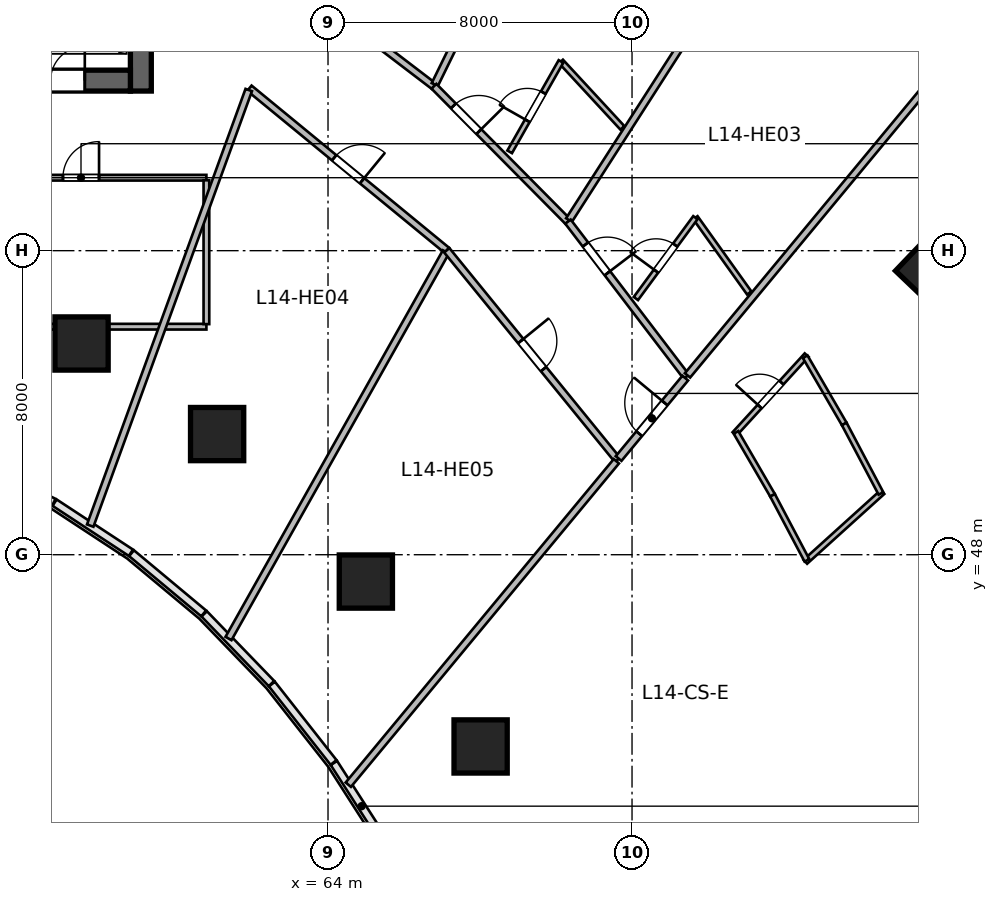
"""IFC4 building model, lengths in metres.
Left out: names, types, materials, properties, quantities, classifications, styles, units other than length and angle.
Written with IfcOpenShell. Run it as: python <this file> out.ifc"""

import sys

from ifc_helpers import new_model, si_unit, direction, frame, frame_2d, origin, origin_2d, place, context, subcontext, project, spatial, rectangle, circle, extrude, source, transform, mapped, element, fill, save


model = new_model("IFC4")
c1 = context("Model", 3, precision=1e-05, world=origin(), true_north=direction((0.0, 1.0)))
c2 = subcontext(c1, "Body", "Model", "MODEL_VIEW")
j1 = project(units=[si_unit("LENGTHUNIT", "METRE"), si_unit("PLANEANGLEUNIT", "RADIAN")], contexts=[c1])
p1 = place(None, origin())
s1 = spatial("IfcSite", under=j1, at=p1, CompositionType="ELEMENT")
p2 = place(p1, origin())
s2 = spatial("IfcBuilding", under=s1, at=p2, CompositionType="ELEMENT")
p3 = place(p2, frame((0.0, 0.0, 64.2)))
s3 = spatial("IfcBuildingStorey", under=s2, at=p3, CompositionType="ELEMENT", Elevation=64.2)
m1 = source(origin(), c2, "Body", "SweptSolid", [
    extrude(rectangle(XDim=12.0, YDim=0.55, at=frame_2d((6.0, 0.0))), origin(), (0.0, 0.0, 1.0), 3.6),
])
p4 = place(p3, frame((59.075, 60.2, 0.0), z_axis=(0.0, 0.0, 1.0), x_axis=(0.0, 1.0, 0.0)))
e1 = element("IfcWall", 1, at=p4, inside=s3, PredefinedType="SHEAR", context=c2, shape_type="MappedRepresentation", body=[
    mapped(m1, transform((0.0, 0.0, 0.0), scale=1.0)),
])
m2 = source(origin(), c2, "Body", "SweptSolid", [
    extrude(rectangle(XDim=21.6, YDim=0.55, at=frame_2d((10.8, 0.0))), origin(), (0.0, 0.0, 1.0), 3.6),
])
p5 = place(p3, frame((37.2, 60.475, 0.0), z_axis=(0.0, 0.0, 1.0), x_axis=(1.0, 0.0, 0.0)))
e2 = element("IfcWall", 2, at=p5, inside=s3, PredefinedType="SHEAR", context=c2, shape_type="MappedRepresentation", body=[
    mapped(m2, transform((0.0, 0.0, 0.0), scale=1.0)),
])
p6 = place(p5, frame((1.1, 0.0, 0.0)))
e3 = element("IfcOpeningElement", 3, at=p6, cuts=e2, PredefinedType="OPENING", context=c2, shape_type="SweptSolid", body=[
    extrude(rectangle(XDim=1.15, YDim=2.15, at=frame_2d((0.575, 1.075))), frame((0.0, 0.285, 0.0), z_axis=(0.0, -1.0, 0.0), x_axis=(1.0, 0.0, 0.0)), (0.0, 0.0, 1.0), 0.57),
])
p7 = place(p5, frame((19.5, 0.0, 0.0)))
e4 = element("IfcOpeningElement", 4, at=p7, cuts=e2, PredefinedType="OPENING", context=c2, shape_type="SweptSolid", body=[
    extrude(rectangle(XDim=0.9, YDim=2.1, at=frame_2d((0.45, 1.05))), frame((0.0, 0.285, 0.0), z_axis=(0.0, -1.0, 0.0), x_axis=(1.0, 0.0, 0.0)), (0.0, 0.0, 1.0), 0.57),
])
p8 = place(p5, frame((12.02, 0.0, 0.0)))
e5 = element("IfcOpeningElement", 5, at=p8, cuts=e2, PredefinedType="OPENING", context=c2, shape_type="SweptSolid", body=[
    extrude(rectangle(XDim=1.6, YDim=2.15, at=frame_2d((0.8, 1.075))), frame((0.0, 0.285, 0.0), z_axis=(0.0, -1.0, 0.0), x_axis=(1.0, 0.0, 0.0)), (0.0, 0.0, 1.0), 0.57),
])
m3 = source(origin(), c2, "Body", "SweptSolid", [
    extrude(circle(Radius=0.7, at=origin_2d()), origin(), (0.0, 0.0, 1.0), 3.6),
])
for number, where, z_axis, x_axis in (
    (6, (57.515, 53.558, 0.0), (0.0, 0.0, 1.0), (0.289, 0.957, 0.0)),
    (7, (61.082, 51.175, 0.0), (0.0, 0.0, 1.0), (0.409, 0.912, 0.0)),
    (8, (64.996, 47.294, 0.0), (0.0, 0.0, 1.0), (0.558, 0.83, 0.0)),
    (9, (68.015, 42.955, 0.0), (0.0, 0.0, 1.0), (0.691, 0.723, 0.0)),
):
    element("IfcColumn", number, at=place(p3, frame(where, z_axis=z_axis, x_axis=x_axis)), inside=s3, PredefinedType="COLUMN", context=c2, shape_type="MappedRepresentation", body=[
        mapped(m3, transform((0.0, 0.0, 0.0), scale=1.0)),
    ])
m4 = source(origin(), c2, "Body", "SweptSolid", [
    extrude(rectangle(XDim=1.5, YDim=1.5, at=origin_2d()), origin(), (0.0, 0.0, 1.0), 3.6),
])
p9 = place(p3, frame((79.993, 55.494, 0.0), z_axis=(0.0, 0.0, 1.0), x_axis=(0.690756218984, 0.723087716626, 0.0)))
e10 = element("IfcColumn", 10, at=p9, inside=s3, PredefinedType="COLUMN", context=c2, shape_type="MappedRepresentation", body=[
    mapped(m4, transform((0.0, 0.0, 0.0), scale=1.0)),
])
m5 = source(origin(), c2, "Body", "SweptSolid", [
    extrude(rectangle(XDim=6.6, YDim=0.15, at=frame_2d((3.3, 0.0))), origin(), (0.0, 0.0, 1.0), 2.803),
])
p10 = place(p3, frame((54.2, 54.0, 0.0), z_axis=(0.0, 0.0, 1.0), x_axis=(1.0, 0.0, 0.0)))
e11 = element("IfcWall", 11, at=p10, inside=s3, PredefinedType="PARTITIONING", context=c2, shape_type="MappedRepresentation", body=[
    mapped(m5, transform((0.0, 0.0, 0.0), scale=1.0)),
])
m6 = source(origin(), c2, "Body", "SweptSolid", [
    extrude(rectangle(XDim=6.6, YDim=0.15, at=frame_2d((3.3, 0.0))), origin(), (0.0, 0.0, 1.0), 3.36),
])
p11 = place(p3, frame((54.2, 57.92, 0.0), z_axis=(0.0, 0.0, 1.0), x_axis=(1.0, 0.0, 0.0)))
e12 = element("IfcWall", 12, at=p11, inside=s3, PredefinedType="PARTITIONING", context=c2, shape_type="MappedRepresentation", body=[
    mapped(m6, transform((0.0, 0.0, 0.0), scale=1.0)),
])
p12 = place(p11, frame((2.825, 0.0, 0.0)))
e13 = element("IfcOpeningElement", 13, at=p12, cuts=e12, PredefinedType="OPENING", context=c2, shape_type="SweptSolid", body=[
    extrude(rectangle(XDim=0.95, YDim=2.1, at=frame_2d((0.475, 1.05))), frame((0.0, 0.085, 0.0), z_axis=(0.0, -1.0, 0.0), x_axis=(1.0, 0.0, 0.0)), (0.0, 0.0, 1.0), 0.17),
])
m7 = source(origin(), c2, "Body", "SweptSolid", [
    extrude(rectangle(XDim=3.785, YDim=0.15, at=frame_2d((1.893, 0.0))), origin(), (0.0, 0.0, 1.0), 3.36),
])
p13 = place(p3, frame((60.8, 54.067, 0.0), z_axis=(0.0, 0.0, 1.0), x_axis=(0.0, 1.0, 0.0)))
e14 = element("IfcWall", 14, at=p13, inside=s3, PredefinedType="PARTITIONING", context=c2, shape_type="MappedRepresentation", body=[
    mapped(m7, transform((0.0, 0.0, 0.0), scale=1.0)),
])
m8 = source(origin(), c2, "Body", "SweptSolid", [
    extrude(rectangle(XDim=4.762, YDim=0.18, at=frame_2d((2.381, 0.0))), origin(), (0.0, 0.0, 1.0), 3.36),
])
p14 = place(p3, frame((63.001, 63.214, 0.0), z_axis=(0.0, 0.0, 1.0), x_axis=(0.795070295872, -0.60651729128, 0.0)))
e15 = element("IfcWall", 15, at=p14, inside=s3, PredefinedType="PLUMBINGWALL", context=c2, shape_type="MappedRepresentation", body=[
    mapped(m8, transform((0.0, 0.0, 0.0), scale=1.0)),
])
p15 = place(p14, frame((0.668, 0.0, 0.0)))
e16 = element("IfcOpeningElement", 16, at=p15, cuts=e15, PredefinedType="OPENING", context=c2, shape_type="SweptSolid", body=[
    extrude(rectangle(XDim=0.95, YDim=2.15, at=frame_2d((0.475, 1.075))), frame((0.0, 0.1, 0.0), z_axis=(0.0, -1.0, 0.0), x_axis=(1.0, 0.0, 0.0)), (0.0, 0.0, 1.0), 0.2),
])
m9 = source(origin(), c2, "Body", "SweptSolid", [
    extrude(rectangle(XDim=11.775, YDim=0.18, at=frame_2d((5.887, 0.0))), origin(), (0.0, 0.0, 1.0), 3.36),
])
p16 = place(p3, frame((66.81, 60.371, 0.0), z_axis=(0.0, 0.0, 1.0), x_axis=(0.4401500056, 0.897924257702, 0.0)))
e17 = element("IfcWall", 17, at=p16, inside=s3, PredefinedType="PLUMBINGWALL", context=c2, shape_type="MappedRepresentation", body=[
    mapped(m9, transform((0.0, 0.0, 0.0), scale=1.0)),
])
m10 = source(origin(), c2, "Body", "SweptSolid", [
    extrude(rectangle(XDim=5.012, YDim=0.18, at=frame_2d((2.506, 0.0))), origin(), (0.0, 0.0, 1.0), 3.36),
])
p17 = place(p3, frame((66.788, 60.326, 0.0), z_axis=(0.0, 0.0, 1.0), x_axis=(0.703664626435, -0.710532260707, 0.0)))
e18 = element("IfcWall", 18, at=p17, inside=s3, PredefinedType="PLUMBINGWALL", context=c2, shape_type="MappedRepresentation", body=[
    mapped(m10, transform((0.0, 0.0, 0.0), scale=1.0)),
])
p18 = place(p17, frame((0.728, 0.0, 0.0)))
e19 = element("IfcOpeningElement", 19, at=p18, cuts=e18, PredefinedType="OPENING", context=c2, shape_type="SweptSolid", body=[
    extrude(rectangle(XDim=0.95, YDim=2.15, at=frame_2d((0.475, 1.075))), frame((0.0, 0.1, 0.0), z_axis=(0.0, -1.0, 0.0), x_axis=(1.0, 0.0, 0.0)), (0.0, 0.0, 1.0), 0.2),
])
m11 = source(origin(), c2, "Body", "SweptSolid", [
    extrude(rectangle(XDim=11.432, YDim=0.18, at=frame_2d((5.716, 0.0))), origin(), (0.0, 0.0, 1.0), 3.36),
])
p19 = place(p3, frame((70.341, 56.805, 0.0), z_axis=(0.0, 0.0, 1.0), x_axis=(0.540196183124, 0.841539115988, 0.0)))
e20 = element("IfcWall", 20, at=p19, inside=s3, PredefinedType="PLUMBINGWALL", context=c2, shape_type="MappedRepresentation", body=[
    mapped(m11, transform((0.0, 0.0, 0.0), scale=1.0)),
])
m12 = source(origin(), c2, "Body", "SweptSolid", [
    extrude(rectangle(XDim=2.38, YDim=0.14, at=frame_2d((1.19, 0.0))), origin(), (0.0, 0.0, 1.0), 3.36),
])
p20 = place(p3, frame((70.131, 60.979, 0.0), z_axis=(0.0, 0.0, 1.0), x_axis=(0.679084816758, -0.734059814762, 0.0)))
e21 = element("IfcWall", 21, at=p20, inside=s3, PredefinedType="PARTITIONING", context=c2, shape_type="MappedRepresentation", body=[
    mapped(m12, transform((0.0, 0.0, 0.0), scale=1.0)),
])
m13 = source(origin(), c2, "Body", "SweptSolid", [
    extrude(rectangle(XDim=2.735, YDim=0.14, at=frame_2d((1.367, 0.0))), origin(), (0.0, 0.0, 1.0), 3.36),
])
p21 = place(p3, frame((68.781, 58.6, 0.0), z_axis=(0.0, 0.0, 1.0), x_axis=(0.493694940578, 0.869635156631, 0.0)))
e22 = element("IfcWall", 22, at=p21, inside=s3, PredefinedType="PARTITIONING", context=c2, shape_type="MappedRepresentation", body=[
    mapped(m13, transform((0.0, 0.0, 0.0), scale=1.0)),
])
p22 = place(p21, frame((0.942, 0.0, 0.0)))
e23 = element("IfcOpeningElement", 23, at=p22, cuts=e22, PredefinedType="OPENING", context=c2, shape_type="SweptSolid", body=[
    extrude(rectangle(XDim=0.85, YDim=2.05, at=frame_2d((0.425, 1.025))), frame((0.0, 0.08, 0.0), z_axis=(0.0, -1.0, 0.0), x_axis=(1.0, 0.0, 0.0)), (0.0, 0.0, 1.0), 0.16),
])
m14 = source(origin(), c2, "Body", "SweptSolid", [
    extrude(rectangle(XDim=5.135, YDim=0.18, at=frame_2d((2.567, 0.0))), origin(), (0.0, 0.0, 1.0), 3.36),
])
p23 = place(p3, frame((70.315, 56.764, 0.0), z_axis=(0.0, 0.0, 1.0), x_axis=(0.606802199649, -0.794852873494, 0.0)))
e24 = element("IfcWall", 24, at=p23, inside=s3, PredefinedType="PLUMBINGWALL", context=c2, shape_type="MappedRepresentation", body=[
    mapped(m14, transform((0.0, 0.0, 0.0), scale=1.0)),
])
p24 = place(p23, frame((0.757, 0.0, 0.0)))
e25 = element("IfcOpeningElement", 25, at=p24, cuts=e24, PredefinedType="OPENING", context=c2, shape_type="SweptSolid", body=[
    extrude(rectangle(XDim=0.95, YDim=2.15, at=frame_2d((0.475, 1.075))), frame((0.0, 0.1, 0.0), z_axis=(0.0, -1.0, 0.0), x_axis=(1.0, 0.0, 0.0)), (0.0, 0.0, 1.0), 0.2),
])
m15 = source(origin(), c2, "Body", "SweptSolid", [
    extrude(rectangle(XDim=10.975, YDim=0.18, at=frame_2d((5.487, 0.0))), origin(), (0.0, 0.0, 1.0), 3.36),
])
p25 = place(p3, frame((73.46, 52.719, 0.0), z_axis=(0.0, 0.0, 1.0), x_axis=(0.638125265812, 0.769932558821, 0.0)))
e26 = element("IfcWall", 26, at=p25, inside=s3, PredefinedType="PLUMBINGWALL", context=c2, shape_type="MappedRepresentation", body=[
    mapped(m15, transform((0.0, 0.0, 0.0), scale=1.0)),
])
m16 = source(origin(), c2, "Body", "SweptSolid", [
    extrude(rectangle(XDim=2.437, YDim=0.14, at=frame_2d((1.218, 0.0))), origin(), (0.0, 0.0, 1.0), 3.36),
])
p26 = place(p3, frame((73.667, 56.868, 0.0), z_axis=(0.0, 0.0, 1.0), x_axis=(0.581797219134, -0.813333877204, 0.0)))
e27 = element("IfcWall", 27, at=p26, inside=s3, PredefinedType="PARTITIONING", context=c2, shape_type="MappedRepresentation", body=[
    mapped(m16, transform((0.0, 0.0, 0.0), scale=1.0)),
])
m17 = source(origin(), c2, "Body", "SweptSolid", [
    extrude(rectangle(XDim=2.642, YDim=0.14, at=frame_2d((1.321, 0.0))), origin(), (0.0, 0.0, 1.0), 3.36),
])
p27 = place(p3, frame((72.101, 54.741, 0.0), z_axis=(0.0, 0.0, 1.0), x_axis=(0.592789122423, 0.805357719487, 0.0)))
e28 = element("IfcWall", 28, at=p27, inside=s3, PredefinedType="PARTITIONING", context=c2, shape_type="MappedRepresentation", body=[
    mapped(m17, transform((0.0, 0.0, 0.0), scale=1.0)),
])
p28 = place(p27, frame((0.896, 0.0, 0.0)))
e29 = element("IfcOpeningElement", 29, at=p28, cuts=e28, PredefinedType="OPENING", context=c2, shape_type="SweptSolid", body=[
    extrude(rectangle(XDim=0.85, YDim=2.05, at=frame_2d((0.425, 1.025))), frame((0.0, 0.08, 0.0), z_axis=(0.0, -1.0, 0.0), x_axis=(1.0, 0.0, 0.0)), (0.0, 0.0, 1.0), 0.16),
])
m18 = source(origin(), c2, "Body", "SweptSolid", [
    extrude(rectangle(XDim=6.721, YDim=0.18, at=frame_2d((3.361, 0.0))), origin(), (0.0, 0.0, 1.0), 3.36),
])
p29 = place(p3, frame((61.931, 60.275, 0.0), z_axis=(0.0, 0.0, 1.0), x_axis=(0.772828051199, -0.63461547671, 0.0)))
e30 = element("IfcWall", 30, at=p29, inside=s3, PredefinedType="PLUMBINGWALL", context=c2, shape_type="MappedRepresentation", body=[
    mapped(m18, transform((0.0, 0.0, 0.0), scale=1.0)),
])
p30 = place(p29, frame((2.885, 0.0, 0.0)))
e31 = element("IfcOpeningElement", 31, at=p30, cuts=e30, PredefinedType="OPENING", context=c2, shape_type="SweptSolid", body=[
    extrude(rectangle(XDim=0.95, YDim=2.15, at=frame_2d((0.475, 1.075))), frame((0.0, 0.1, 0.0), z_axis=(0.0, -1.0, 0.0), x_axis=(1.0, 0.0, 0.0)), (0.0, 0.0, 1.0), 0.2),
])
m19 = source(origin(), c2, "Body", "SweptSolid", [
    extrude(rectangle(XDim=12.196, YDim=0.18, at=frame_2d((6.098, 0.0))), origin(), (0.0, 0.0, 1.0), 3.36),
])
p31 = place(p3, frame((57.742, 48.766, 0.0), z_axis=(0.0, 0.0, 1.0), x_axis=(0.342022711534, 0.939691686031, 0.0)))
e32 = element("IfcWall", 32, at=p31, inside=s3, PredefinedType="PLUMBINGWALL", context=c2, shape_type="MappedRepresentation", body=[
    mapped(m19, transform((0.0, 0.0, 0.0), scale=1.0)),
])
m20 = source(origin(), c2, "Body", "SweptSolid", [
    extrude(rectangle(XDim=11.67, YDim=0.18, at=frame_2d((5.835, 0.0))), origin(), (0.0, 0.0, 1.0), 3.36),
])
p32 = place(p3, frame((61.381, 45.795, 0.0), z_axis=(0.0, 0.0, 1.0), x_axis=(0.490156946222, 0.871634193954, 0.0)))
e33 = element("IfcWall", 33, at=p32, inside=s3, PredefinedType="PLUMBINGWALL", context=c2, shape_type="MappedRepresentation", body=[
    mapped(m20, transform((0.0, 0.0, 0.0), scale=1.0)),
])
m21 = source(origin(), c2, "Body", "SweptSolid", [
    extrude(rectangle(XDim=7.113, YDim=0.18, at=frame_2d((3.556, 0.0))), origin(), (0.0, 0.0, 1.0), 3.36),
])
p33 = place(p3, frame((67.126, 56.01, 0.0), z_axis=(0.0, 0.0, 1.0), x_axis=(0.63149032532, -0.775383755974, 0.0)))
e34 = element("IfcWall", 34, at=p33, inside=s3, PredefinedType="PLUMBINGWALL", context=c2, shape_type="MappedRepresentation", body=[
    mapped(m21, transform((0.0, 0.0, 0.0), scale=1.0)),
])
p34 = place(p33, frame((3.081, 0.0, 0.0)))
e35 = element("IfcOpeningElement", 35, at=p34, cuts=e34, PredefinedType="OPENING", context=c2, shape_type="SweptSolid", body=[
    extrude(rectangle(XDim=0.95, YDim=2.15, at=frame_2d((0.475, 1.075))), frame((0.0, 0.1, 0.0), z_axis=(0.0, -1.0, 0.0), x_axis=(1.0, 0.0, 0.0)), (0.0, 0.0, 1.0), 0.2),
])
m22 = source(origin(), c2, "Body", "SweptSolid", [
    extrude(rectangle(XDim=11.053, YDim=0.18, at=frame_2d((5.527, 0.0))), origin(), (0.0, 0.0, 1.0), 3.36),
])
p35 = place(p3, frame((64.534, 41.949, 0.0), z_axis=(0.0, 0.0, 1.0), x_axis=(0.638131235571, 0.769927611005, 0.0)))
e36 = element("IfcWall", 36, at=p35, inside=s3, PredefinedType="PLUMBINGWALL", context=c2, shape_type="MappedRepresentation", body=[
    mapped(m22, transform((0.0, 0.0, 0.0), scale=1.0)),
])
m23 = source(origin(), c2, "Body", "SweptSolid", [
    extrude(rectangle(XDim=2.748, YDim=0.195, at=frame_2d((1.374, 0.0))), origin(), (0.0, 0.0, 1.0), 3.36),
])
p36 = place(p3, frame((71.647, 50.531, 0.0), z_axis=(0.0, 0.0, 1.0), x_axis=(0.638111168284, 0.769944242729, 0.0)))
e37 = element("IfcWall", 37, at=p36, inside=s3, PredefinedType="PARTITIONING", context=c2, shape_type="MappedRepresentation", body=[
    mapped(m23, transform((0.0, 0.0, 0.0), scale=1.0)),
])
p37 = place(p36, frame((0.849, 0.0, 0.0)))
e38 = element("IfcOpeningElement", 38, at=p37, cuts=e37, PredefinedType="OPENING", context=c2, shape_type="SweptSolid", body=[
    extrude(rectangle(XDim=1.05, YDim=2.15, at=frame_2d((0.525, 1.075))), frame((0.0, 0.107, 0.0), z_axis=(0.0, -1.0, 0.0), x_axis=(1.0, 0.0, 0.0)), (0.0, 0.0, 1.0), 0.215),
])
m24 = source(origin(), c2, "Body", "SweptSolid", [
    extrude(rectangle(XDim=2.812, YDim=0.14, at=frame_2d((1.406, 0.0))), origin(), (0.0, 0.0, 1.0), 3.36),
])
p38 = place(p3, frame((74.697, 51.177, 0.0), z_axis=(0.0, 0.0, 1.0), x_axis=(0.675119025852, 0.737708818527, 0.0)))
e39 = element("IfcWall", 39, at=p38, inside=s3, PredefinedType="PARTITIONING", context=c2, shape_type="MappedRepresentation", body=[
    mapped(m24, transform((0.0, 0.0, 0.0), scale=1.0)),
])
p39 = place(p38, frame((0.981, 0.0, 0.0)))
e40 = element("IfcOpeningElement", 40, at=p39, cuts=e39, PredefinedType="OPENING", context=c2, shape_type="SweptSolid", body=[
    extrude(rectangle(XDim=0.85, YDim=2.05, at=frame_2d((0.425, 1.025))), frame((0.0, 0.08, 0.0), z_axis=(0.0, -1.0, 0.0), x_axis=(1.0, 0.0, 0.0)), (0.0, 0.0, 1.0), 0.16),
])
m25 = source(origin(), c2, "Body", "SweptSolid", [
    extrude(rectangle(XDim=2.738, YDim=0.14, at=frame_2d((1.369, 0.0))), origin(), (0.0, 0.0, 1.0), 3.36),
])
p40 = place(p3, frame((76.56, 47.814, 0.0), z_axis=(0.0, 0.0, 1.0), x_axis=(0.741873676582, 0.670539669218, 0.0)))
e41 = element("IfcWall", 41, at=p40, inside=s3, PredefinedType="PARTITIONING", context=c2, shape_type="MappedRepresentation", body=[
    mapped(m25, transform((0.0, 0.0, 0.0), scale=1.0)),
])
m26 = source(origin(), c2, "Body", "SweptSolid", [
    extrude(rectangle(XDim=1.914, YDim=0.14, at=frame_2d((0.957, 0.0))), origin(), (0.0, 0.0, 1.0), 3.36),
])
p41 = place(p3, frame((74.736, 51.219, 0.0), z_axis=(0.0, 0.0, 1.0), x_axis=(0.502347790612, -0.864665656347, 0.0)))
e42 = element("IfcWall", 42, at=p41, inside=s3, PredefinedType="PARTITIONING", context=c2, shape_type="MappedRepresentation", body=[
    mapped(m26, transform((0.0, 0.0, 0.0), scale=1.0)),
])
m27 = source(origin(), c2, "Body", "SweptSolid", [
    extrude(rectangle(XDim=2.045, YDim=0.14, at=frame_2d((1.022, 0.0))), origin(), (0.0, 0.0, 1.0), 3.36),
])
p42 = place(p3, frame((76.557, 53.209, 0.0), z_axis=(0.0, 0.0, 1.0), x_axis=(0.5023112139, -0.864686905411, 0.0)))
e43 = element("IfcWall", 43, at=p42, inside=s3, PredefinedType="PARTITIONING", context=c2, shape_type="MappedRepresentation", body=[
    mapped(m27, transform((0.0, 0.0, 0.0), scale=1.0)),
])
m28 = source(origin(), c2, "Body", "SweptSolid", [
    extrude(rectangle(XDim=1.936, YDim=0.14, at=frame_2d((0.968, 0.0))), origin(), (0.0, 0.0, 1.0), 3.36),
])
p43 = place(p3, frame((75.697, 49.563, 0.0), z_axis=(0.0, 0.0, 1.0), x_axis=(0.467174971862, -0.884164886017, 0.0)))
e44 = element("IfcWall", 44, at=p43, inside=s3, PredefinedType="PARTITIONING", context=c2, shape_type="MappedRepresentation", body=[
    mapped(m28, transform((0.0, 0.0, 0.0), scale=1.0)),
])
m29 = source(origin(), c2, "Body", "SweptSolid", [
    extrude(rectangle(XDim=2.068, YDim=0.14, at=frame_2d((1.034, 0.0))), origin(), (0.0, 0.0, 1.0), 3.36),
])
p44 = place(p3, frame((77.584, 51.441, 0.0), z_axis=(0.0, 0.0, 1.0), x_axis=(0.467215057643, -0.884143704333, 0.0)))
e45 = element("IfcWall", 45, at=p44, inside=s3, PredefinedType="PARTITIONING", context=c2, shape_type="MappedRepresentation", body=[
    mapped(m29, transform((0.0, 0.0, 0.0), scale=1.0)),
])
m30 = source(origin(), c2, "Body", "SweptSolid", [
    extrude(rectangle(XDim=0.9, YDim=2.1, at=frame_2d((0.45, 1.05))), frame((0.0, 0.025, 0.0), z_axis=(0.0, -1.0, 0.0), x_axis=(1.0, 0.0, 0.0)), (0.0, 0.0, 1.0), 0.05),
])
p45 = place(p7, origin())
e46 = element("IfcDoor", 46, at=p45, inside=s3, OperationType="SINGLE_SWING_RIGHT", PredefinedType="DOOR", context=c2, shape_type="MappedRepresentation", body=[
    mapped(m30, transform((0.0, 0.0, 0.0), scale=1.0)),
])
fill(e4, e46)
m31 = source(origin(), c2, "Body", "SweptSolid", [
    extrude(rectangle(XDim=0.95, YDim=2.1, at=frame_2d((0.475, 1.05))), frame((0.0, 0.025, 0.0), z_axis=(0.0, -1.0, 0.0), x_axis=(1.0, 0.0, 0.0)), (0.0, 0.0, 1.0), 0.05),
])
p46 = place(p12, origin())
e47 = element("IfcDoor", 47, at=p46, inside=s3, OperationType="SINGLE_SWING_RIGHT", PredefinedType="DOOR", context=c2, shape_type="MappedRepresentation", body=[
    mapped(m31, transform((0.0, 0.0, 0.0), scale=1.0)),
])
fill(e13, e47)
m32 = source(origin(), c2, "Body", "SweptSolid", [
    extrude(rectangle(XDim=0.95, YDim=2.15, at=frame_2d((0.475, 1.075))), frame((0.0, 0.025, 0.0), z_axis=(0.0, -1.0, 0.0), x_axis=(1.0, 0.0, 0.0)), (0.0, 0.0, 1.0), 0.05),
])
p47 = place(p18, origin())
e48 = element("IfcDoor", 48, at=p47, inside=s3, OperationType="SINGLE_SWING_RIGHT", PredefinedType="DOOR", context=c2, shape_type="MappedRepresentation", body=[
    mapped(m32, transform((0.0, 0.0, 0.0), scale=1.0)),
])
fill(e19, e48)
m33 = source(origin(), c2, "Body", "SweptSolid", [
    extrude(rectangle(XDim=0.85, YDim=2.05, at=frame_2d((0.425, 1.025))), frame((0.0, 0.025, 0.0), z_axis=(0.0, -1.0, 0.0), x_axis=(1.0, 0.0, 0.0)), (0.0, 0.0, 1.0), 0.05),
])
p48 = place(p22, origin())
e49 = element("IfcDoor", 49, at=p48, inside=s3, OperationType="SINGLE_SWING_LEFT", PredefinedType="DOOR", context=c2, shape_type="MappedRepresentation", body=[
    mapped(m33, transform((0.0, 0.0, 0.0), scale=1.0)),
])
fill(e23, e49)
p49 = place(p24, origin())
e50 = element("IfcDoor", 50, at=p49, inside=s3, OperationType="SINGLE_SWING_RIGHT", PredefinedType="DOOR", context=c2, shape_type="MappedRepresentation", body=[
    mapped(m32, transform((0.0, 0.0, 0.0), scale=1.0)),
])
fill(e25, e50)
p50 = place(p28, origin())
e51 = element("IfcDoor", 51, at=p50, inside=s3, OperationType="SINGLE_SWING_LEFT", PredefinedType="DOOR", context=c2, shape_type="MappedRepresentation", body=[
    mapped(m33, transform((0.0, 0.0, 0.0), scale=1.0)),
])
fill(e29, e51)
p51 = place(p30, origin())
e52 = element("IfcDoor", 52, at=p51, inside=s3, OperationType="SINGLE_SWING_RIGHT", PredefinedType="DOOR", context=c2, shape_type="MappedRepresentation", body=[
    mapped(m32, transform((0.0, 0.0, 0.0), scale=1.0)),
])
fill(e31, e52)
p52 = place(p34, origin())
e53 = element("IfcDoor", 53, at=p52, inside=s3, OperationType="SINGLE_SWING_LEFT", PredefinedType="DOOR", context=c2, shape_type="MappedRepresentation", body=[
    mapped(m32, transform((0.0, 0.0, 0.0), scale=1.0)),
])
fill(e35, e53)
m34 = source(origin(), c2, "Body", "SweptSolid", [
    extrude(rectangle(XDim=1.05, YDim=2.15, at=frame_2d((0.525, 1.075))), frame((0.0, 0.025, 0.0), z_axis=(0.0, -1.0, 0.0), x_axis=(1.0, 0.0, 0.0)), (0.0, 0.0, 1.0), 0.05),
])
p53 = place(p37, origin())
e54 = element("IfcDoor", 54, at=p53, inside=s3, OperationType="SINGLE_SWING_RIGHT", PredefinedType="DOOR", context=c2, shape_type="MappedRepresentation", body=[
    mapped(m34, transform((0.0, 0.0, 0.0), scale=1.0)),
])
fill(e38, e54)
p54 = place(p39, origin())
e55 = element("IfcDoor", 55, at=p54, inside=s3, OperationType="SINGLE_SWING_LEFT", PredefinedType="DOOR", context=c2, shape_type="MappedRepresentation", body=[
    mapped(m33, transform((0.0, 0.0, 0.0), scale=1.0)),
])
fill(e40, e55)
save(model, sys.argv[1])
